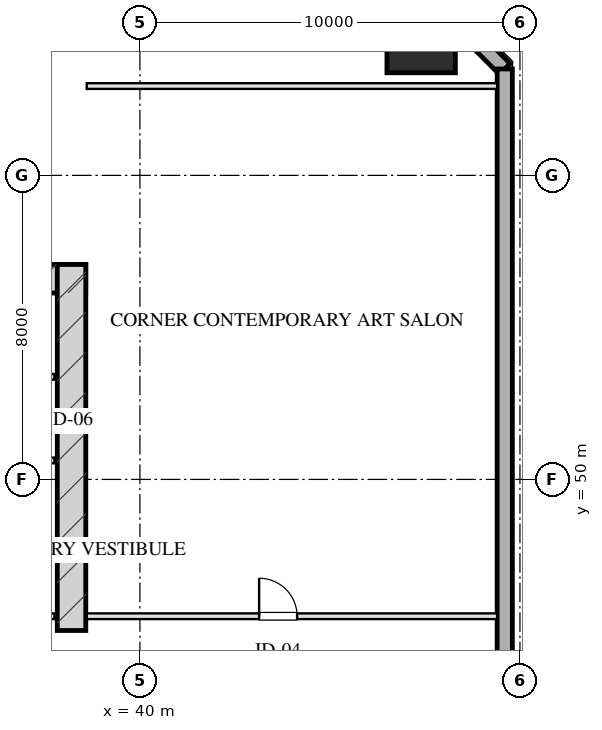
"""IFC4 building model, lengths in metres.
Left out: names, types, materials, properties, quantities, classifications, styles, units other than length and angle.
Written with IfcOpenShell. Run it as: python <this file> out.ifc"""

import sys

from ifc_helpers import new_model, si_unit, direction, frame, frame_2d, origin, origin_2d, place, context, subcontext, project, spatial, rectangle, hollow_rectangle, extrude, element, fill, save


model = new_model("IFC4")
c1 = context("Model", 3, precision=1e-05, world=origin(), true_north=direction((0.0, 1.0)))
c2 = subcontext(c1, "Body", "Model", "MODEL_VIEW")
j1 = project(units=[si_unit("LENGTHUNIT", "METRE"), si_unit("PLANEANGLEUNIT", "RADIAN")], contexts=[c1])
p1 = place(None, origin())
s1 = spatial("IfcSite", under=j1, at=p1, CompositionType="ELEMENT")
p2 = place(p1, origin())
s2 = spatial("IfcBuilding", under=s1, at=p2, CompositionType="ELEMENT")
p3 = place(p2, frame((0.0, 0.0, 60.95)))
s3 = spatial("IfcBuildingStorey", under=s2, at=p3, CompositionType="ELEMENT", Elevation=60.95)
p4 = place(p3, frame((21.425, 55.28, 0.0), z_axis=(0.0, 0.0, 1.0), x_axis=(1.0, 0.0, 0.0)))
e1 = element("IfcWall", 1, at=p4, inside=s3, PredefinedType="SHEAR", context=c2, shape_type="SweptSolid", body=[
    extrude(rectangle(XDim=17.15, YDim=0.75, at=frame_2d((8.575, 0.0))), origin(), (0.0, 0.0, 1.0), 3.45),
])
p5 = place(p3, frame((38.2, 46.025, 0.0), z_axis=(0.0, 0.0, 1.0), x_axis=(0.0, 1.0, 0.0)))
e2 = element("IfcWall", 2, at=p5, inside=s3, PredefinedType="SHEAR", context=c2, shape_type="SweptSolid", body=[
    extrude(rectangle(XDim=9.63, YDim=0.75, at=frame_2d((4.815, 0.0))), origin(), (0.0, 0.0, 1.0), 3.45),
])
p6 = place(p3, frame((47.4, 61.6, 0.0), z_axis=(0.0, 0.0, 1.0), x_axis=(1.0, 0.0, 0.0)))
e3 = element("IfcColumn", 3, at=p6, inside=s3, PredefinedType="COLUMN", context=c2, shape_type="SweptSolid", body=[
    extrude(hollow_rectangle(XDim=1.8, YDim=1.8, WallThickness=0.06, at=origin_2d()), origin(), (0.0, 0.0, 1.0), 3.451),
])
p7 = place(p3, frame((46.6, 63.8, 0.0), z_axis=(0.0, 0.0, 1.0), x_axis=(0.707106781187, -0.707106781187, 0.0)))
e4 = element("IfcWall", 4, at=p7, inside=s3, PredefinedType="SOLIDWALL", context=c2, shape_type="SweptSolid", body=[
    extrude(rectangle(XDim=4.243, YDim=0.4, at=frame_2d((2.121, 0.0))), origin(), (0.0, 0.0, 1.0), 2.61),
])
p8 = place(p3, frame((49.6, 60.8, 0.0), z_axis=(0.0, 0.0, 1.0), x_axis=(0.0, -1.0, 0.0)))
e5 = element("IfcWall", 5, at=p8, inside=s3, PredefinedType="SOLIDWALL", context=c2, shape_type="SweptSolid", body=[
    extrude(rectangle(XDim=53.6, YDim=0.4, at=frame_2d((26.8, 0.0))), origin(), (0.0, 0.0, 1.0), 2.61),
])
p9 = place(p8, frame((32.05, 0.0, 0.0)))
e6 = element("IfcOpeningElement", 6, at=p9, cuts=e5, PredefinedType="OPENING", context=c2, shape_type="SweptSolid", body=[
    extrude(rectangle(XDim=1.1, YDim=2.15, at=frame_2d((0.55, 1.075))), frame((0.0, 0.21, 0.0), z_axis=(0.0, -1.0, 0.0), x_axis=(1.0, 0.0, 0.0)), (0.0, 0.0, 1.0), 0.42),
])
p10 = place(p3, frame((33.95, 46.4, 0.0), z_axis=(0.0, 0.0, 1.0), x_axis=(1.0, 0.0, 0.0)))
e7 = element("IfcWall", 7, at=p10, inside=s3, PredefinedType="PARTITIONING", context=c2, shape_type="SweptSolid", body=[
    extrude(rectangle(XDim=3.8, YDim=0.15, at=frame_2d((1.9, 0.0))), origin(), (0.0, 0.0, 1.0), 3.175),
])
p11 = place(p10, frame((0.22, 0.0, 0.0)))
e8 = element("IfcOpeningElement", 8, at=p11, cuts=e7, PredefinedType="OPENING", context=c2, shape_type="SweptSolid", body=[
    extrude(rectangle(XDim=0.95, YDim=2.05, at=frame_2d((0.475, 1.025))), frame((0.0, 0.085, 0.0), z_axis=(0.0, -1.0, 0.0), x_axis=(1.0, 0.0, 0.0)), (0.0, 0.0, 1.0), 0.17),
])
for number, where, z_axis, x_axis in (
    (9, (35.45, 50.5, 0.0), (0.0, 0.0, 1.0), (1.0, 0.0, 0.0)),
    (10, (35.45, 52.7, 0.0), (0.0, 0.0, 1.0), (1.0, 0.0, 0.0)),
):
    element("IfcWall", number, at=place(p3, frame(where, z_axis=z_axis, x_axis=x_axis)), inside=s3, PredefinedType="PARTITIONING", context=c2, shape_type="SweptSolid", body=[
        extrude(rectangle(XDim=2.3, YDim=0.15, at=frame_2d((1.15, 0.0))), origin(), (0.0, 0.0, 1.0), 3.175),
    ])
p12 = place(p3, frame((38.6, 60.35, 0.0), z_axis=(0.0, 0.0, 1.0), x_axis=(1.0, 0.0, 0.0)))
e11 = element("IfcWall", 11, at=p12, inside=s3, PredefinedType="PARTITIONING", context=c2, shape_type="SweptSolid", body=[
    extrude(rectangle(XDim=10.8, YDim=0.15, at=frame_2d((5.4, 0.0))), origin(), (0.0, 0.0, 1.0), 3.175),
])
p13 = place(p3, frame((38.6, 46.4, 0.0), z_axis=(0.0, 0.0, 1.0), x_axis=(1.0, 0.0, 0.0)))
e12 = element("IfcWall", 12, at=p13, inside=s3, PredefinedType="PARTITIONING", context=c2, shape_type="SweptSolid", body=[
    extrude(rectangle(XDim=10.8, YDim=0.15, at=frame_2d((5.4, 0.0))), origin(), (0.0, 0.0, 1.0), 3.175),
])
p14 = place(p13, frame((4.536, 0.0, 0.0)))
e13 = element("IfcOpeningElement", 13, at=p14, cuts=e12, PredefinedType="OPENING", context=c2, shape_type="SweptSolid", body=[
    extrude(rectangle(XDim=1.0, YDim=2.05, at=frame_2d((0.5, 1.025))), frame((0.0, 0.085, 0.0), z_axis=(0.0, -1.0, 0.0), x_axis=(1.0, 0.0, 0.0)), (0.0, 0.0, 1.0), 0.17),
])
p15 = place(p14, origin())
e14 = element("IfcDoor", 14, at=p15, inside=s3, OperationType="SINGLE_SWING_LEFT", PredefinedType="DOOR", context=c2, shape_type="SweptSolid", body=[
    extrude(rectangle(XDim=1.0, YDim=2.05, at=frame_2d((0.5, 1.025))), frame((0.0, 0.025, 0.0), z_axis=(0.0, -1.0, 0.0), x_axis=(1.0, 0.0, 0.0)), (0.0, 0.0, 1.0), 0.05),
])
fill(e13, e14)
save(model, sys.argv[1])
